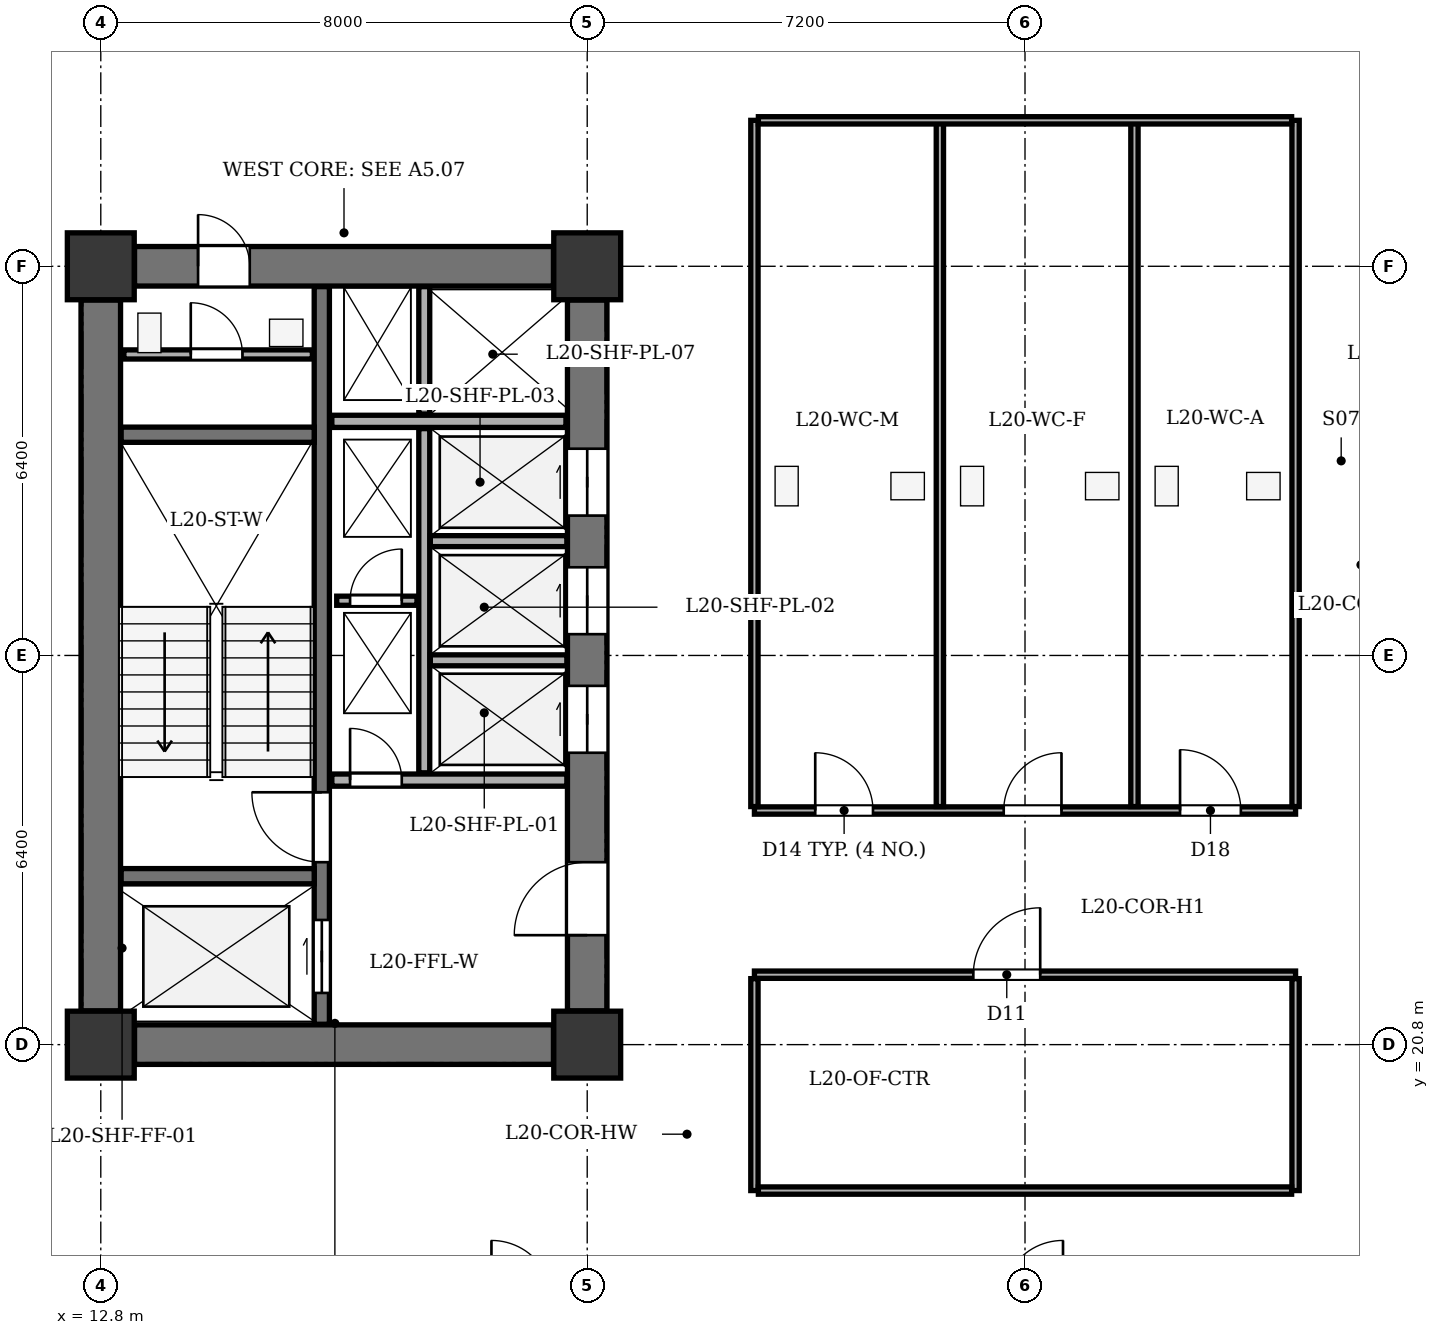
"""IFC4 building model, lengths in metres.
Left out: names, types, materials, properties, quantities, classifications, styles, units other than length and angle.
Written with IfcOpenShell. Run it as: python <this file> out.ifc"""

import sys

from ifc_helpers import new_model, si_unit, direction, frame, frame_2d, origin, origin_2d, place, context, subcontext, project, spatial, rectangle, extrude, element, fill, save


model = new_model("IFC4")
c1 = context("Model", 3, precision=1e-05, world=origin(), true_north=direction((0.0, 1.0)))
c2 = subcontext(c1, "Body", "Model", "MODEL_VIEW")
j1 = project(units=[si_unit("LENGTHUNIT", "METRE"), si_unit("PLANEANGLEUNIT", "RADIAN")], contexts=[c1])
p1 = place(None, origin())
s1 = spatial("IfcSite", under=j1, at=p1, CompositionType="ELEMENT")
p2 = place(p1, origin())
s2 = spatial("IfcBuilding", under=s1, at=p2, CompositionType="ELEMENT")
p3 = place(p2, frame((0.0, 0.0, 82.8)))
s3 = spatial("IfcBuildingStorey", under=s2, at=p3, CompositionType="ELEMENT", Elevation=82.8)
for number, where, z_axis, x_axis in (
    (1, (12.8, 20.8, 0.0), (0.0, 0.0, 1.0), (1.0, 0.0, 0.0)),
    (2, (20.8, 20.8, 0.0), (0.0, 0.0, 1.0), (1.0, 0.0, 0.0)),
    (3, (12.8, 33.6, 0.0), (0.0, 0.0, 1.0), (1.0, 0.0, 0.0)),
    (4, (20.8, 33.6, 0.0), (0.0, 0.0, 1.0), (1.0, 0.0, 0.0)),
):
    element("IfcColumn", number, at=place(p3, frame(where, z_axis=z_axis, x_axis=x_axis)), inside=s3, PredefinedType="COLUMN", context=c2, shape_type="SweptSolid", body=[
        extrude(rectangle(XDim=1.1, YDim=1.1, at=origin_2d()), origin(), (0.0, 0.0, 1.0), 3.9),
    ])
p4 = place(p3, frame((12.8, 21.355, 0.0), z_axis=(0.0, 0.0, 1.0), x_axis=(0.0, 1.0, 0.0)))
e5 = element("IfcWall", 5, at=p4, inside=s3, PredefinedType="SHEAR", context=c2, shape_type="SweptSolid", body=[
    extrude(rectangle(XDim=11.69, YDim=0.65, at=frame_2d((5.845, 0.0))), origin(), (0.0, 0.0, 1.0), 3.6),
])
p5 = place(p3, frame((13.355, 20.8, 0.0), z_axis=(0.0, 0.0, 1.0), x_axis=(1.0, 0.0, 0.0)))
e6 = element("IfcWall", 6, at=p5, inside=s3, PredefinedType="SHEAR", context=c2, shape_type="SweptSolid", body=[
    extrude(rectangle(XDim=6.89, YDim=0.65, at=frame_2d((3.445, 0.0))), origin(), (0.0, 0.0, 1.0), 3.6),
])
p6 = place(p3, frame((13.355, 33.6, 0.0), z_axis=(0.0, 0.0, 1.0), x_axis=(1.0, 0.0, 0.0)))
e7 = element("IfcWall", 7, at=p6, inside=s3, PredefinedType="SHEAR", context=c2, shape_type="SweptSolid", body=[
    extrude(rectangle(XDim=6.89, YDim=0.65, at=frame_2d((3.445, 0.0))), origin(), (0.0, 0.0, 1.0), 3.6),
])
p7 = place(p6, frame((1.045, 0.0, 0.0)))
e8 = element("IfcOpeningElement", 8, at=p7, cuts=e7, PredefinedType="OPENING", context=c2, shape_type="SweptSolid", body=[
    extrude(rectangle(XDim=0.85, YDim=2.02, at=frame_2d((0.425, 1.01))), frame((0.0, 0.335, 0.0), z_axis=(0.0, -1.0, 0.0), x_axis=(1.0, 0.0, 0.0)), (0.0, 0.0, 1.0), 0.67),
])
p8 = place(p3, frame((20.8, 21.355, 0.0), z_axis=(0.0, 0.0, 1.0), x_axis=(0.0, 1.0, 0.0)))
e9 = element("IfcWall", 9, at=p8, inside=s3, PredefinedType="SHEAR", context=c2, shape_type="SweptSolid", body=[
    extrude(rectangle(XDim=11.69, YDim=0.65, at=frame_2d((5.845, 0.0))), origin(), (0.0, 0.0, 1.0), 3.6),
])
p9 = place(p8, frame((1.245, 0.0, 0.0)))
e10 = element("IfcOpeningElement", 10, at=p9, cuts=e9, PredefinedType="OPENING", context=c2, shape_type="SweptSolid", body=[
    extrude(rectangle(XDim=1.2, YDim=2.15, at=frame_2d((0.6, 1.075))), frame((0.0, 0.335, 0.0), z_axis=(0.0, -1.0, 0.0), x_axis=(1.0, 0.0, 0.0)), (0.0, 0.0, 1.0), 0.67),
])
p10 = place(p8, frame((4.245, 0.0, 0.0)))
e11 = element("IfcOpeningElement", 11, at=p10, cuts=e9, PredefinedType="OPENING", context=c2, shape_type="SweptSolid", body=[
    extrude(rectangle(XDim=1.1, YDim=2.1, at=frame_2d((0.55, 1.05))), frame((0.0, 0.335, 0.0), z_axis=(0.0, -1.0, 0.0), x_axis=(1.0, 0.0, 0.0)), (0.0, 0.0, 1.0), 0.67),
])
p11 = place(p8, frame((6.195, 0.0, 0.0)))
e12 = element("IfcOpeningElement", 12, at=p11, cuts=e9, PredefinedType="OPENING", context=c2, shape_type="SweptSolid", body=[
    extrude(rectangle(XDim=1.1, YDim=2.1, at=frame_2d((0.55, 1.05))), frame((0.0, 0.335, 0.0), z_axis=(0.0, -1.0, 0.0), x_axis=(1.0, 0.0, 0.0)), (0.0, 0.0, 1.0), 0.67),
])
p12 = place(p8, frame((8.145, 0.0, 0.0)))
e13 = element("IfcOpeningElement", 13, at=p12, cuts=e9, PredefinedType="OPENING", context=c2, shape_type="SweptSolid", body=[
    extrude(rectangle(XDim=1.1, YDim=2.1, at=frame_2d((0.55, 1.05))), frame((0.0, 0.335, 0.0), z_axis=(0.0, -1.0, 0.0), x_axis=(1.0, 0.0, 0.0)), (0.0, 0.0, 1.0), 0.67),
])
p13 = place(p3, frame((16.435, 21.135, 0.0), z_axis=(0.0, 0.0, 1.0), x_axis=(0.0, 1.0, 0.0)))
e14 = element("IfcWall", 14, at=p13, inside=s3, PredefinedType="SHEAR", context=c2, shape_type="SweptSolid", body=[
    extrude(rectangle(XDim=12.13, YDim=0.25, at=frame_2d((6.065, 0.0))), origin(), (0.0, 0.0, 1.0), 3.6),
])
p14 = place(p13, frame((0.515, 0.0, 0.0)))
e15 = element("IfcOpeningElement", 15, at=p14, cuts=e14, PredefinedType="OPENING", context=c2, shape_type="SweptSolid", body=[
    extrude(rectangle(XDim=1.2, YDim=2.15, at=frame_2d((0.6, 1.075))), frame((0.0, 0.135, 0.0), z_axis=(0.0, -1.0, 0.0), x_axis=(1.0, 0.0, 0.0)), (0.0, 0.0, 1.0), 0.27),
])
p15 = place(p13, frame((2.665, 0.0, 0.0)))
e16 = element("IfcOpeningElement", 16, at=p15, cuts=e14, PredefinedType="OPENING", context=c2, shape_type="SweptSolid", body=[
    extrude(rectangle(XDim=1.15, YDim=2.15, at=frame_2d((0.575, 1.075))), frame((0.0, 0.135, 0.0), z_axis=(0.0, -1.0, 0.0), x_axis=(1.0, 0.0, 0.0)), (0.0, 0.0, 1.0), 0.27),
])
for number, where, z_axis, x_axis in (
    (17, (13.135, 23.57, 0.0), (0.0, 0.0, 1.0), (1.0, 0.0, 0.0)),
    (18, (13.135, 30.83, 0.0), (0.0, 0.0, 1.0), (1.0, 0.0, 0.0)),
):
    element("IfcWall", number, at=place(p3, frame(where, z_axis=z_axis, x_axis=x_axis)), inside=s3, PredefinedType="SHEAR", context=c2, shape_type="SweptSolid", body=[
        extrude(rectangle(XDim=3.175, YDim=0.25, at=frame_2d((1.587, 0.0))), origin(), (0.0, 0.0, 1.0), 3.6),
    ])
p16 = place(p3, frame((16.6, 25.15, 0.0), z_axis=(0.0, 0.0, 1.0), x_axis=(1.0, 0.0, 0.0)))
e19 = element("IfcWall", 19, at=p16, inside=s3, PredefinedType="SOLIDWALL", context=c2, shape_type="SweptSolid", body=[
    extrude(rectangle(XDim=3.865, YDim=0.2, at=frame_2d((1.933, 0.0))), origin(), (0.0, 0.0, 1.0), 3.6),
])
p17 = place(p16, frame((0.3, 0.0, 0.0)))
e20 = element("IfcOpeningElement", 20, at=p17, cuts=e19, PredefinedType="OPENING", context=c2, shape_type="SweptSolid", body=[
    extrude(rectangle(XDim=0.85, YDim=2.02, at=frame_2d((0.425, 1.01))), frame((0.0, 0.11, 0.0), z_axis=(0.0, -1.0, 0.0), x_axis=(1.0, 0.0, 0.0)), (0.0, 0.0, 1.0), 0.22),
])
p18 = place(p3, frame((16.6, 31.05, 0.0), z_axis=(0.0, 0.0, 1.0), x_axis=(1.0, 0.0, 0.0)))
e21 = element("IfcWall", 21, at=p18, inside=s3, PredefinedType="SOLIDWALL", context=c2, shape_type="SweptSolid", body=[
    extrude(rectangle(XDim=3.85, YDim=0.2, at=frame_2d((1.925, 0.0))), origin(), (0.0, 0.0, 1.0), 3.6),
])
p19 = place(p3, frame((18.12, 25.27, 0.0), z_axis=(0.0, 0.0, 1.0), x_axis=(0.0, 1.0, 0.0)))
e22 = element("IfcWall", 22, at=p19, inside=s3, PredefinedType="PARTITIONING", context=c2, shape_type="SweptSolid", body=[
    extrude(rectangle(XDim=5.66, YDim=0.18, at=frame_2d((2.83, 0.0))), origin(), (0.0, 0.0, 1.0), 3.6),
])
p20 = place(p3, frame((18.12, 31.17, 0.0), z_axis=(0.0, 0.0, 1.0), x_axis=(0.0, 1.0, 0.0)))
e23 = element("IfcWall", 23, at=p20, inside=s3, PredefinedType="PARTITIONING", context=c2, shape_type="SweptSolid", body=[
    extrude(rectangle(XDim=2.095, YDim=0.18, at=frame_2d((1.047, 0.0))), origin(), (0.0, 0.0, 1.0), 3.6),
])
for number, where, z_axis, x_axis in (
    (24, (18.22, 27.12, 0.0), (0.0, 0.0, 1.0), (1.0, 0.0, 0.0)),
    (25, (18.22, 29.08, 0.0), (0.0, 0.0, 1.0), (1.0, 0.0, 0.0)),
):
    element("IfcWall", number, at=place(p3, frame(where, z_axis=z_axis, x_axis=x_axis)), inside=s3, PredefinedType="PARTITIONING", context=c2, shape_type="SweptSolid", body=[
        extrude(rectangle(XDim=2.245, YDim=0.18, at=frame_2d((1.123, 0.0))), origin(), (0.0, 0.0, 1.0), 3.6),
    ])
p21 = place(p3, frame((13.18, 32.15, 0.0), z_axis=(0.0, 0.0, 1.0), x_axis=(1.0, 0.0, 0.0)))
e26 = element("IfcWall", 26, at=p21, inside=s3, PredefinedType="PARTITIONING", context=c2, shape_type="SweptSolid", body=[
    extrude(rectangle(XDim=3.1, YDim=0.15, at=frame_2d((1.55, 0.0))), origin(), (0.0, 0.0, 1.0), 3.6),
])
p22 = place(p21, frame((1.1, 0.0, 0.0)))
e27 = element("IfcOpeningElement", 27, at=p22, cuts=e26, PredefinedType="OPENING", context=c2, shape_type="SweptSolid", body=[
    extrude(rectangle(XDim=0.85, YDim=2.02, at=frame_2d((0.425, 1.01))), frame((0.0, 0.085, 0.0), z_axis=(0.0, -1.0, 0.0), x_axis=(1.0, 0.0, 0.0)), (0.0, 0.0, 1.0), 0.17),
])
p23 = place(p3, frame((16.68, 28.1, 0.0), z_axis=(0.0, 0.0, 1.0), x_axis=(1.0, 0.0, 0.0)))
e28 = element("IfcWall", 28, at=p23, inside=s3, PredefinedType="PARTITIONING", context=c2, shape_type="SweptSolid", body=[
    extrude(rectangle(XDim=1.32, YDim=0.15, at=frame_2d((0.66, 0.0))), origin(), (0.0, 0.0, 1.0), 3.6),
])
p24 = place(p23, frame((0.22, 0.0, 0.0)))
e29 = element("IfcOpeningElement", 29, at=p24, cuts=e28, PredefinedType="OPENING", context=c2, shape_type="SweptSolid", body=[
    extrude(rectangle(XDim=0.85, YDim=2.02, at=frame_2d((0.425, 1.01))), frame((0.0, 0.085, 0.0), z_axis=(0.0, -1.0, 0.0), x_axis=(1.0, 0.0, 0.0)), (0.0, 0.0, 1.0), 0.17),
])
p25 = place(p3, frame((23.55, 24.65, 0.0), z_axis=(0.0, 0.0, 1.0), x_axis=(1.0, 0.0, 0.0)))
e30 = element("IfcWall", 30, at=p25, inside=s3, PredefinedType="PARTITIONING", context=c2, shape_type="SweptSolid", body=[
    extrude(rectangle(XDim=8.9, YDim=0.12, at=frame_2d((4.45, 0.0))), origin(), (0.0, 0.0, 1.0), 3.135),
])
p26 = place(p25, frame((1.0, 0.0, 0.0)))
e31 = element("IfcOpeningElement", 31, at=p26, cuts=e30, PredefinedType="OPENING", context=c2, shape_type="SweptSolid", body=[
    extrude(rectangle(XDim=0.95, YDim=2.1, at=frame_2d((0.475, 1.05))), frame((0.0, 0.07, 0.0), z_axis=(0.0, -1.0, 0.0), x_axis=(1.0, 0.0, 0.0)), (0.0, 0.0, 1.0), 0.14),
])
p27 = place(p25, frame((4.1, 0.0, 0.0)))
e32 = element("IfcOpeningElement", 32, at=p27, cuts=e30, PredefinedType="OPENING", context=c2, shape_type="SweptSolid", body=[
    extrude(rectangle(XDim=0.95, YDim=2.1, at=frame_2d((0.475, 1.05))), frame((0.0, 0.07, 0.0), z_axis=(0.0, -1.0, 0.0), x_axis=(1.0, 0.0, 0.0)), (0.0, 0.0, 1.0), 0.14),
])
p28 = place(p25, frame((7.0, 0.0, 0.0)))
e33 = element("IfcOpeningElement", 33, at=p28, cuts=e30, PredefinedType="OPENING", context=c2, shape_type="SweptSolid", body=[
    extrude(rectangle(XDim=1.0, YDim=2.1, at=frame_2d((0.5, 1.05))), frame((0.0, 0.07, 0.0), z_axis=(0.0, -1.0, 0.0), x_axis=(1.0, 0.0, 0.0)), (0.0, 0.0, 1.0), 0.14),
])
for number, where, z_axis, x_axis in (
    (34, (23.55, 24.715, 0.0), (0.0, 0.0, 1.0), (0.0, 1.0, 0.0)),
    (35, (32.45, 24.715, 0.0), (0.0, 0.0, 1.0), (0.0, 1.0, 0.0)),
    (36, (26.6, 24.715, 0.0), (0.0, 0.0, 1.0), (0.0, 1.0, 0.0)),
):
    element("IfcWall", number, at=place(p3, frame(where, z_axis=z_axis, x_axis=x_axis)), inside=s3, PredefinedType="PARTITIONING", context=c2, shape_type="SweptSolid", body=[
        extrude(rectangle(XDim=11.285, YDim=0.12, at=frame_2d((5.643, 0.0))), origin(), (0.0, 0.0, 1.0), 3.6),
    ])
p29 = place(p3, frame((29.8, 24.715, 0.0), z_axis=(0.0, 0.0, 1.0), x_axis=(0.0, 1.0, 0.0)))
e37 = element("IfcWall", 37, at=p29, inside=s3, PredefinedType="PARTITIONING", context=c2, shape_type="SweptSolid", body=[
    extrude(rectangle(XDim=11.285, YDim=0.12, at=frame_2d((5.643, 0.0))), origin(), (0.0, 0.0, 1.0), 3.135),
])
p30 = place(p3, frame((23.615, 36.0, 0.0), z_axis=(0.0, 0.0, 1.0), x_axis=(1.0, 0.0, 0.0)))
e38 = element("IfcWall", 38, at=p30, inside=s3, PredefinedType="PARTITIONING", context=c2, shape_type="SweptSolid", body=[
    extrude(rectangle(XDim=8.77, YDim=0.12, at=frame_2d((4.385, 0.0))), origin(), (0.0, 0.0, 1.0), 3.6),
])
p31 = place(p3, frame((23.55, 21.95, 0.0), z_axis=(0.0, 0.0, 1.0), x_axis=(1.0, 0.0, 0.0)))
e39 = element("IfcWall", 39, at=p31, inside=s3, PredefinedType="PARTITIONING", context=c2, shape_type="SweptSolid", body=[
    extrude(rectangle(XDim=8.9, YDim=0.12, at=frame_2d((4.45, 0.0))), origin(), (0.0, 0.0, 1.0), 3.135),
])
p32 = place(p31, frame((3.6, 0.0, 0.0)))
e40 = element("IfcOpeningElement", 40, at=p32, cuts=e39, PredefinedType="OPENING", context=c2, shape_type="SweptSolid", body=[
    extrude(rectangle(XDim=1.1, YDim=2.15, at=frame_2d((0.55, 1.075))), frame((0.0, 0.07, 0.0), z_axis=(0.0, -1.0, 0.0), x_axis=(1.0, 0.0, 0.0)), (0.0, 0.0, 1.0), 0.14),
])
for number, where, z_axis, x_axis in (
    (41, (23.55, 18.4, 0.0), (0.0, 0.0, 1.0), (0.0, 1.0, 0.0)),
    (42, (32.45, 18.4, 0.0), (0.0, 0.0, 1.0), (0.0, 1.0, 0.0)),
):
    element("IfcWall", number, at=place(p3, frame(where, z_axis=z_axis, x_axis=x_axis)), inside=s3, PredefinedType="PARTITIONING", context=c2, shape_type="SweptSolid", body=[
        extrude(rectangle(XDim=3.485, YDim=0.12, at=frame_2d((1.743, 0.0))), origin(), (0.0, 0.0, 1.0), 3.6),
    ])
p33 = place(p3, frame((23.615, 18.4, 0.0), z_axis=(0.0, 0.0, 1.0), x_axis=(1.0, 0.0, 0.0)))
e43 = element("IfcWall", 43, at=p33, inside=s3, PredefinedType="PARTITIONING", context=c2, shape_type="SweptSolid", body=[
    extrude(rectangle(XDim=8.77, YDim=0.12, at=frame_2d((4.385, 0.0))), origin(), (0.0, 0.0, 1.0), 3.6),
])
p34 = place(p7, origin())
e44 = element("IfcDoor", 44, at=p34, inside=s3, OperationType="SINGLE_SWING_LEFT", PredefinedType="DOOR", context=c2, shape_type="SweptSolid", body=[
    extrude(rectangle(XDim=0.85, YDim=2.02, at=frame_2d((0.425, 1.01))), frame((0.0, 0.025, 0.0), z_axis=(0.0, -1.0, 0.0), x_axis=(1.0, 0.0, 0.0)), (0.0, 0.0, 1.0), 0.05),
])
fill(e8, e44)
p35 = place(p9, origin())
e45 = element("IfcDoor", 45, at=p35, inside=s3, OperationType="SINGLE_SWING_LEFT", PredefinedType="DOOR", context=c2, shape_type="SweptSolid", body=[
    extrude(rectangle(XDim=1.2, YDim=2.15, at=frame_2d((0.6, 1.075))), frame((0.0, 0.025, 0.0), z_axis=(0.0, -1.0, 0.0), x_axis=(1.0, 0.0, 0.0)), (0.0, 0.0, 1.0), 0.05),
])
fill(e10, e45)
p36 = place(p10, origin())
e46 = element("IfcDoor", 46, at=p36, inside=s3, OperationType="DOUBLE_DOOR_SLIDING", PredefinedType="DOOR", context=c2, shape_type="SweptSolid", body=[
    extrude(rectangle(XDim=1.1, YDim=2.1, at=frame_2d((0.55, 1.05))), frame((0.0, 0.025, 0.0), z_axis=(0.0, -1.0, 0.0), x_axis=(1.0, 0.0, 0.0)), (0.0, 0.0, 1.0), 0.05),
])
fill(e11, e46)
p37 = place(p11, origin())
e47 = element("IfcDoor", 47, at=p37, inside=s3, OperationType="DOUBLE_DOOR_SLIDING", PredefinedType="DOOR", context=c2, shape_type="SweptSolid", body=[
    extrude(rectangle(XDim=1.1, YDim=2.1, at=frame_2d((0.55, 1.05))), frame((0.0, 0.025, 0.0), z_axis=(0.0, -1.0, 0.0), x_axis=(1.0, 0.0, 0.0)), (0.0, 0.0, 1.0), 0.05),
])
fill(e12, e47)
p38 = place(p12, origin())
e48 = element("IfcDoor", 48, at=p38, inside=s3, OperationType="DOUBLE_DOOR_SLIDING", PredefinedType="DOOR", context=c2, shape_type="SweptSolid", body=[
    extrude(rectangle(XDim=1.1, YDim=2.1, at=frame_2d((0.55, 1.05))), frame((0.0, 0.025, 0.0), z_axis=(0.0, -1.0, 0.0), x_axis=(1.0, 0.0, 0.0)), (0.0, 0.0, 1.0), 0.05),
])
fill(e13, e48)
p39 = place(p14, origin())
e49 = element("IfcDoor", 49, at=p39, inside=s3, OperationType="DOUBLE_DOOR_SLIDING", PredefinedType="DOOR", context=c2, shape_type="SweptSolid", body=[
    extrude(rectangle(XDim=1.2, YDim=2.15, at=frame_2d((0.6, 1.075))), frame((0.0, 0.025, 0.0), z_axis=(0.0, -1.0, 0.0), x_axis=(1.0, 0.0, 0.0)), (0.0, 0.0, 1.0), 0.05),
])
fill(e15, e49)
p40 = place(p15, origin())
e50 = element("IfcDoor", 50, at=p40, inside=s3, OperationType="SINGLE_SWING_RIGHT", PredefinedType="DOOR", context=c2, shape_type="SweptSolid", body=[
    extrude(rectangle(XDim=1.15, YDim=2.15, at=frame_2d((0.575, 1.075))), frame((0.0, 0.025, 0.0), z_axis=(0.0, -1.0, 0.0), x_axis=(1.0, 0.0, 0.0)), (0.0, 0.0, 1.0), 0.05),
])
fill(e16, e50)
p41 = place(p17, origin())
e51 = element("IfcDoor", 51, at=p41, inside=s3, OperationType="SINGLE_SWING_LEFT", PredefinedType="DOOR", context=c2, shape_type="SweptSolid", body=[
    extrude(rectangle(XDim=0.85, YDim=2.02, at=frame_2d((0.425, 1.01))), frame((0.0, 0.025, 0.0), z_axis=(0.0, -1.0, 0.0), x_axis=(1.0, 0.0, 0.0)), (0.0, 0.0, 1.0), 0.05),
])
fill(e20, e51)
p42 = place(p22, origin())
e52 = element("IfcDoor", 52, at=p42, inside=s3, OperationType="SINGLE_SWING_LEFT", PredefinedType="DOOR", context=c2, shape_type="SweptSolid", body=[
    extrude(rectangle(XDim=0.85, YDim=2.02, at=frame_2d((0.425, 1.01))), frame((0.0, 0.025, 0.0), z_axis=(0.0, -1.0, 0.0), x_axis=(1.0, 0.0, 0.0)), (0.0, 0.0, 1.0), 0.05),
])
fill(e27, e52)
p43 = place(p24, origin())
e53 = element("IfcDoor", 53, at=p43, inside=s3, OperationType="SINGLE_SWING_RIGHT", PredefinedType="DOOR", context=c2, shape_type="SweptSolid", body=[
    extrude(rectangle(XDim=0.85, YDim=2.02, at=frame_2d((0.425, 1.01))), frame((0.0, 0.025, 0.0), z_axis=(0.0, -1.0, 0.0), x_axis=(1.0, 0.0, 0.0)), (0.0, 0.0, 1.0), 0.05),
])
fill(e29, e53)
p44 = place(p26, origin())
e54 = element("IfcDoor", 54, at=p44, inside=s3, OperationType="SINGLE_SWING_LEFT", PredefinedType="DOOR", context=c2, shape_type="SweptSolid", body=[
    extrude(rectangle(XDim=0.95, YDim=2.1, at=frame_2d((0.475, 1.05))), frame((0.0, 0.025, 0.0), z_axis=(0.0, -1.0, 0.0), x_axis=(1.0, 0.0, 0.0)), (0.0, 0.0, 1.0), 0.05),
])
fill(e31, e54)
p45 = place(p27, origin())
e55 = element("IfcDoor", 55, at=p45, inside=s3, OperationType="SINGLE_SWING_RIGHT", PredefinedType="DOOR", context=c2, shape_type="SweptSolid", body=[
    extrude(rectangle(XDim=0.95, YDim=2.1, at=frame_2d((0.475, 1.05))), frame((0.0, 0.025, 0.0), z_axis=(0.0, -1.0, 0.0), x_axis=(1.0, 0.0, 0.0)), (0.0, 0.0, 1.0), 0.05),
])
fill(e32, e55)
p46 = place(p28, origin())
e56 = element("IfcDoor", 56, at=p46, inside=s3, OperationType="SINGLE_SWING_LEFT", PredefinedType="DOOR", context=c2, shape_type="SweptSolid", body=[
    extrude(rectangle(XDim=1.0, YDim=2.1, at=frame_2d((0.5, 1.05))), frame((0.0, 0.025, 0.0), z_axis=(0.0, -1.0, 0.0), x_axis=(1.0, 0.0, 0.0)), (0.0, 0.0, 1.0), 0.05),
])
fill(e33, e56)
p47 = place(p32, origin())
e57 = element("IfcDoor", 57, at=p47, inside=s3, OperationType="SINGLE_SWING_RIGHT", PredefinedType="DOOR", context=c2, shape_type="SweptSolid", body=[
    extrude(rectangle(XDim=1.1, YDim=2.15, at=frame_2d((0.55, 1.075))), frame((0.0, 0.025, 0.0), z_axis=(0.0, -1.0, 0.0), x_axis=(1.0, 0.0, 0.0)), (0.0, 0.0, 1.0), 0.05),
])
fill(e40, e57)
save(model, sys.argv[1])
